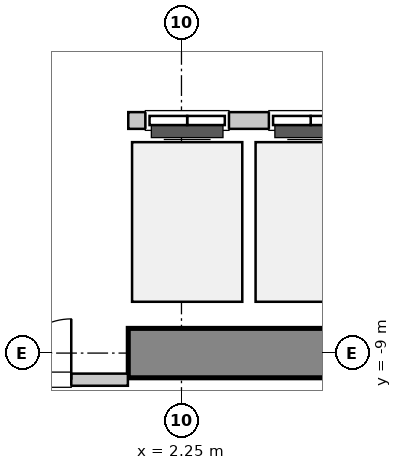
"""IFC4 building model, lengths in metres.
Left out: names, types, materials, properties, quantities, classifications, styles, units other than length and angle.
Written with IfcOpenShell. Run it as: python <this file> out.ifc"""

import sys

from ifc_helpers import new_model, si_unit, direction, frame, frame_2d, origin, place, context, subcontext, project, spatial, rectangle, extrude, source, transform, mapped, element, fill, save


model = new_model("IFC4")
c1 = context("Model", 3, precision=1e-05, world=origin(), true_north=direction((0.0, 1.0)))
c2 = subcontext(c1, "Body", "Model", "MODEL_VIEW")
j1 = project(units=[si_unit("LENGTHUNIT", "METRE"), si_unit("PLANEANGLEUNIT", "RADIAN")], contexts=[c1])
p1 = place(None, origin())
s1 = spatial("IfcSite", under=j1, at=p1, CompositionType="ELEMENT")
p2 = place(p1, origin())
s2 = spatial("IfcBuilding", under=s1, at=p2, CompositionType="ELEMENT")
p3 = place(p2, origin())
s3 = spatial("IfcBuildingStorey", under=s2, at=p3, CompositionType="ELEMENT", Elevation=0.0)
m1 = source(origin(), c2, "Body", "SweptSolid", [
    extrude(rectangle(XDim=10.025, YDim=0.65, at=frame_2d((5.012, 0.0))), origin(), (0.0, 0.0, 1.0), 6.0),
])
p4 = place(p3, frame((1.55, -9.0, 0.0), z_axis=(0.0, 0.0, 1.0), x_axis=(1.0, 0.0, 0.0)))
e1 = element("IfcWall", 1, at=p4, inside=s3, PredefinedType="SHEAR", context=c2, shape_type="MappedRepresentation", body=[
    mapped(m1, transform((0.0, 0.0, 0.0), x_axis=(1.0, 0.0, 0.0), y_axis=(0.0, 1.0, 0.0), z_axis=(0.0, 0.0, 1.0), scale=1.0)),
])
m2 = source(origin(), c2, "Body", "SweptSolid", [
    extrude(rectangle(XDim=3.2, YDim=0.22, at=frame_2d((1.6, 0.0))), origin(), (0.0, 0.0, 1.0), 5.685),
])
p5 = place(p3, frame((4.75, -5.94, 0.0), z_axis=(0.0, 0.0, 1.0), x_axis=(-1.0, 0.0, 0.0)))
e2 = element("IfcWall", 2, at=p5, inside=s3, PredefinedType="SOLIDWALL", context=c2, shape_type="MappedRepresentation", body=[
    mapped(m2, transform((0.0, 0.0, 0.0), x_axis=(1.0, 0.0, 0.0), y_axis=(0.0, 1.0, 0.0), z_axis=(0.0, 0.0, 1.0), scale=1.0)),
])
p6 = place(p5, frame((1.875, 0.0, 0.0)))
e3 = element("IfcOpeningElement", 3, at=p6, cuts=e2, PredefinedType="OPENING", context=c2, shape_type="SweptSolid", body=[
    extrude(rectangle(XDim=1.1, YDim=2.2, at=frame_2d((0.55, 1.1))), frame((0.0, 0.12, 0.0), z_axis=(0.0, -1.0, 0.0), x_axis=(1.0, 0.0, 0.0)), (0.0, 0.0, 1.0), 0.24),
])
p7 = place(p5, frame((0.25, 0.0, 0.0)))
e4 = element("IfcOpeningElement", 4, at=p7, cuts=e2, PredefinedType="OPENING", context=c2, shape_type="SweptSolid", body=[
    extrude(rectangle(XDim=1.1, YDim=2.2, at=frame_2d((0.55, 1.1))), frame((0.0, 0.12, 0.0), z_axis=(0.0, -1.0, 0.0), x_axis=(1.0, 0.0, 0.0)), (0.0, 0.0, 1.0), 0.24),
])
m3 = source(origin(), c2, "Body", "SweptSolid", [
    extrude(rectangle(XDim=3.09, YDim=0.16, at=frame_2d((1.545, 0.0))), origin(), (0.0, 0.0, 1.0), 4.575),
])
p8 = place(p3, frame((-1.545, -9.35, 0.0), z_axis=(0.0, 0.0, 1.0), x_axis=(1.0, 0.0, 0.0)))
e5 = element("IfcWall", 5, at=p8, inside=s3, PredefinedType="PARTITIONING", context=c2, shape_type="MappedRepresentation", body=[
    mapped(m3, transform((0.0, 0.0, 0.0), x_axis=(1.0, 0.0, 0.0), y_axis=(0.0, 1.0, 0.0), z_axis=(0.0, 0.0, 1.0), scale=1.0)),
])
p9 = place(p8, frame((0.745, 0.0, 0.0)))
e6 = element("IfcOpeningElement", 6, at=p9, cuts=e5, PredefinedType="OPENING", context=c2, shape_type="SweptSolid", body=[
    extrude(rectangle(XDim=1.6, YDim=2.3, at=frame_2d((0.8, 1.15))), frame((0.0, 0.09, 0.0), z_axis=(0.0, -1.0, 0.0), x_axis=(1.0, 0.0, 0.0)), (0.0, 0.0, 1.0), 0.18),
])
m4 = source(origin(), c2, "Body", "SweptSolid", [
    extrude(rectangle(XDim=1.1, YDim=2.2, at=frame_2d((0.55, 1.1))), frame((0.0, 0.025, 0.0), z_axis=(0.0, -1.0, 0.0), x_axis=(1.0, 0.0, 0.0)), (0.0, 0.0, 1.0), 0.05),
])
p10 = place(p6, origin())
e7 = element("IfcDoor", 7, at=p10, inside=s3, OperationType="DOUBLE_DOOR_SLIDING", PredefinedType="DOOR", context=c2, shape_type="MappedRepresentation", body=[
    mapped(m4, transform((0.0, 0.0, 0.0), x_axis=(1.0, 0.0, 0.0), y_axis=(0.0, 1.0, 0.0), z_axis=(0.0, 0.0, 1.0), scale=1.0)),
])
fill(e3, e7)
p11 = place(p7, origin())
e8 = element("IfcDoor", 8, at=p11, inside=s3, OperationType="DOUBLE_DOOR_SLIDING", PredefinedType="DOOR", context=c2, shape_type="MappedRepresentation", body=[
    mapped(m4, transform((0.0, 0.0, 0.0), x_axis=(1.0, 0.0, 0.0), y_axis=(0.0, 1.0, 0.0), z_axis=(0.0, 0.0, 1.0), scale=1.0)),
])
fill(e4, e8)
m5 = source(origin(), c2, "Body", "SweptSolid", [
    extrude(rectangle(XDim=1.6, YDim=2.3, at=frame_2d((0.8, 1.15))), frame((0.0, 0.025, 0.0), z_axis=(0.0, -1.0, 0.0), x_axis=(1.0, 0.0, 0.0)), (0.0, 0.0, 1.0), 0.05),
])
p12 = place(p9, origin())
e9 = element("IfcDoor", 9, at=p12, inside=s3, OperationType="DOUBLE_DOOR_SINGLE_SWING", PredefinedType="DOOR", context=c2, shape_type="MappedRepresentation", body=[
    mapped(m5, transform((0.0, 0.0, 0.0), x_axis=(1.0, 0.0, 0.0), y_axis=(0.0, 1.0, 0.0), z_axis=(0.0, 0.0, 1.0), scale=1.0)),
])
fill(e6, e9)
save(model, sys.argv[1])
